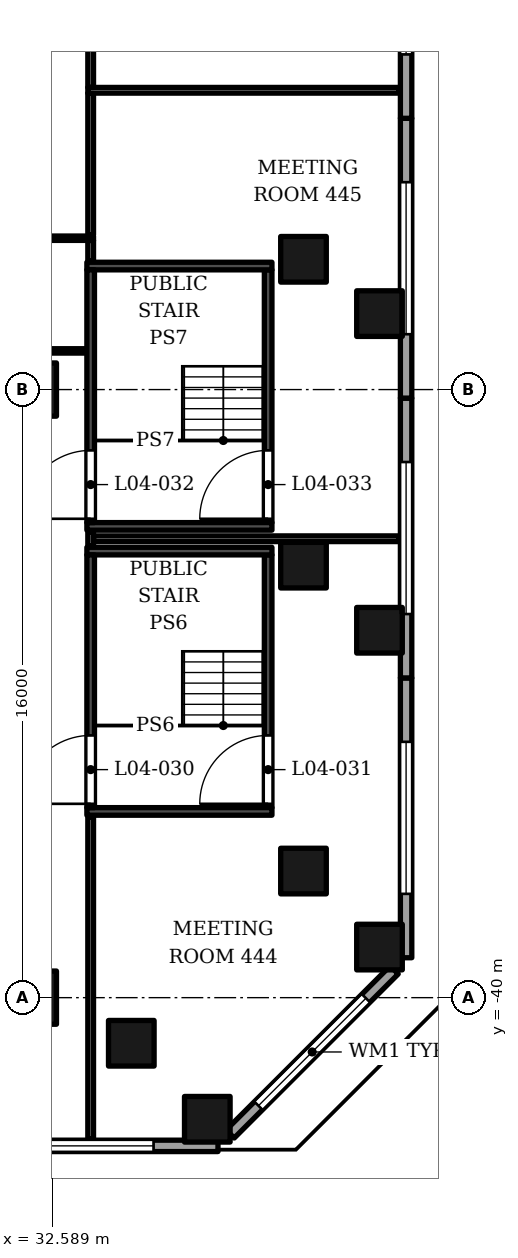
"""IFC4 building model, lengths in metres.
Left out: names, types, materials, properties, quantities, classifications, styles, units other than length and angle.
Written with IfcOpenShell. Run it as: python <this file> out.ifc"""

import sys

from ifc_helpers import new_model, si_unit, direction, frame, frame_2d, origin, origin_2d, place, context, subcontext, project, spatial, rectangle, extrude, element, fill, save


model = new_model("IFC4")
c1 = context("Model", 3, precision=1e-05, world=origin(), true_north=direction((0.0, 1.0)))
c2 = subcontext(c1, "Body", "Model", "MODEL_VIEW")
j1 = project(units=[si_unit("LENGTHUNIT", "METRE"), si_unit("PLANEANGLEUNIT", "RADIAN")], contexts=[c1])
p1 = place(None, origin())
s1 = spatial("IfcSite", under=j1, at=p1, CompositionType="ELEMENT")
p2 = place(p1, origin())
s2 = spatial("IfcBuilding", under=s1, at=p2, CompositionType="ELEMENT")
p3 = place(p2, frame((0.0, 0.0, 34.5)))
s3 = spatial("IfcBuildingStorey", under=s2, at=p3, CompositionType="ELEMENT", Elevation=34.5)
for number, where, z_axis, x_axis in (
    (1, (32.0, -40.0, 0.0), (0.0, 0.0, 1.0), (1.0, 0.0, 0.0)),
    (2, (32.0, -24.0, 0.0), (0.0, 0.0, 1.0), (1.0, 0.0, 0.0)),
):
    element("IfcColumn", number, at=place(p3, frame(where, z_axis=z_axis, x_axis=x_axis)), inside=s3, PredefinedType="COLUMN", context=c2, shape_type="SweptSolid", body=[
        extrude(rectangle(XDim=1.4, YDim=1.4, at=origin_2d()), origin(), (0.0, 0.0, 1.0), 5.5),
    ])
for number, where, z_axis, x_axis in (
    (3, (39.2, -36.669, 0.0), (0.0, 0.0, 1.0), (1.0, 0.0, 0.0)),
    (4, (34.669, -41.2, 0.0), (0.0, 0.0, 1.0), (1.0, 0.0, 0.0)),
    (5, (39.2, -20.572, 0.0), (0.0, 0.0, 1.0), (1.0, 0.0, 0.0)),
    (6, (39.2, -28.62, 0.0), (0.0, 0.0, 1.0), (1.0, 0.0, 0.0)),
    (7, (41.2, -38.669, 0.0), (0.0, 0.0, 1.0), (1.0, 0.0, 0.0)),
    (8, (36.669, -43.2, 0.0), (0.0, 0.0, 1.0), (1.0, 0.0, 0.0)),
    (9, (41.2, -22.001, 0.0), (0.0, 0.0, 1.0), (1.0, 0.0, 0.0)),
    (10, (41.2, -30.333, 0.0), (0.0, 0.0, 1.0), (1.0, 0.0, 0.0)),
):
    element("IfcColumn", number, at=place(p3, frame(where, z_axis=z_axis, x_axis=x_axis)), inside=s3, PredefinedType="COLUMN", context=c2, shape_type="SweptSolid", body=[
        extrude(rectangle(XDim=1.2, YDim=1.2, at=origin_2d()), origin(), (0.0, 0.0, 1.0), 5.5),
    ])
p4 = place(p3, frame((29.56, -43.9, 0.0), z_axis=(0.0, 0.0, 1.0), x_axis=(1.0, 0.0, 0.0)))
e11 = element("IfcWall", 11, at=p4, inside=s3, PredefinedType="SOLIDWALL", context=c2, shape_type="SweptSolid", body=[
    extrude(rectangle(XDim=7.39, YDim=0.3, at=frame_2d((3.695, 0.0))), origin(), (0.0, 0.0, 1.0), 4.1),
])
p5 = place(p4, frame((1.695, 0.0, 1.0)))
e12 = element("IfcOpeningElement", 12, at=p5, cuts=e11, PredefinedType="OPENING", context=c2, shape_type="SweptSolid", body=[
    extrude(rectangle(XDim=4.0, YDim=1.8, at=frame_2d((2.0, 0.9))), frame((0.0, 0.16, 0.0), z_axis=(0.0, -1.0, 0.0), x_axis=(1.0, 0.0, 0.0)), (0.0, 0.0, 1.0), 0.32),
])
p6 = place(p3, frame((37.271, -43.588, 0.0), z_axis=(0.0, 0.0, 1.0), x_axis=(0.707106781187, 0.707106781187, 0.0)))
e13 = element("IfcWall", 13, at=p6, inside=s3, PredefinedType="SOLIDWALL", context=c2, shape_type="SweptSolid", body=[
    extrude(rectangle(XDim=6.105, YDim=0.3, at=frame_2d((3.052, 0.0))), origin(), (0.0, 0.0, 1.0), 3.85),
])
p7 = place(p6, frame((1.052, 0.0, 1.0)))
e14 = element("IfcOpeningElement", 14, at=p7, cuts=e13, PredefinedType="OPENING", context=c2, shape_type="SweptSolid", body=[
    extrude(rectangle(XDim=4.0, YDim=1.8, at=frame_2d((2.0, 0.9))), frame((0.0, 0.16, 0.0), z_axis=(0.0, -1.0, 0.0), x_axis=(1.0, 0.0, 0.0)), (0.0, 0.0, 1.0), 0.32),
])
p8 = place(p3, frame((41.9, -38.95, 0.0), z_axis=(0.0, 0.0, 1.0), x_axis=(0.0, 1.0, 0.0)))
e15 = element("IfcWall", 15, at=p8, inside=s3, PredefinedType="SOLIDWALL", context=c2, shape_type="SweptSolid", body=[
    extrude(rectangle(XDim=7.363, YDim=0.3, at=frame_2d((3.681, 0.0))), origin(), (0.0, 0.0, 1.0), 4.1),
])
p9 = place(p8, frame((1.681, 0.0, 1.0)))
e16 = element("IfcOpeningElement", 16, at=p9, cuts=e15, PredefinedType="OPENING", context=c2, shape_type="SweptSolid", body=[
    extrude(rectangle(XDim=4.0, YDim=1.8, at=frame_2d((2.0, 0.9))), frame((0.0, 0.16, 0.0), z_axis=(0.0, -1.0, 0.0), x_axis=(1.0, 0.0, 0.0)), (0.0, 0.0, 1.0), 0.32),
])
p10 = place(p3, frame((41.9, -31.587, 0.0), z_axis=(0.0, 0.0, 1.0), x_axis=(0.0, 1.0, 0.0)))
e17 = element("IfcWall", 17, at=p10, inside=s3, PredefinedType="SOLIDWALL", context=c2, shape_type="SweptSolid", body=[
    extrude(rectangle(XDim=7.362, YDim=0.3, at=frame_2d((3.681, 0.0))), origin(), (0.0, 0.0, 1.0), 4.1),
])
p11 = place(p10, frame((1.681, 0.0, 1.0)))
e18 = element("IfcOpeningElement", 18, at=p11, cuts=e17, PredefinedType="OPENING", context=c2, shape_type="SweptSolid", body=[
    extrude(rectangle(XDim=4.0, YDim=1.8, at=frame_2d((2.0, 0.9))), frame((0.0, 0.16, 0.0), z_axis=(0.0, -1.0, 0.0), x_axis=(1.0, 0.0, 0.0)), (0.0, 0.0, 1.0), 0.32),
])
p12 = place(p3, frame((41.9, -24.225, 0.0), z_axis=(0.0, 0.0, 1.0), x_axis=(0.0, 1.0, 0.0)))
e19 = element("IfcWall", 19, at=p12, inside=s3, PredefinedType="SOLIDWALL", context=c2, shape_type="SweptSolid", body=[
    extrude(rectangle(XDim=7.363, YDim=0.3, at=frame_2d((3.681, 0.0))), origin(), (0.0, 0.0, 1.0), 4.1),
])
p13 = place(p12, frame((1.681, 0.0, 1.0)))
e20 = element("IfcOpeningElement", 20, at=p13, cuts=e19, PredefinedType="OPENING", context=c2, shape_type="SweptSolid", body=[
    extrude(rectangle(XDim=4.0, YDim=1.8, at=frame_2d((2.0, 0.9))), frame((0.0, 0.16, 0.0), z_axis=(0.0, -1.0, 0.0), x_axis=(1.0, 0.0, 0.0)), (0.0, 0.0, 1.0), 0.32),
])
p14 = place(p3, frame((41.9, -16.863, 0.0), z_axis=(0.0, 0.0, 1.0), x_axis=(0.0, 1.0, 0.0)))
e21 = element("IfcWall", 21, at=p14, inside=s3, PredefinedType="SOLIDWALL", context=c2, shape_type="SweptSolid", body=[
    extrude(rectangle(XDim=7.363, YDim=0.3, at=frame_2d((3.681, 0.0))), origin(), (0.0, 0.0, 1.0), 4.1),
])
p15 = place(p14, frame((1.681, 0.0, 1.0)))
e22 = element("IfcOpeningElement", 22, at=p15, cuts=e21, PredefinedType="OPENING", context=c2, shape_type="SweptSolid", body=[
    extrude(rectangle(XDim=4.0, YDim=1.8, at=frame_2d((2.0, 0.9))), frame((0.0, 0.16, 0.0), z_axis=(0.0, -1.0, 0.0), x_axis=(1.0, 0.0, 0.0)), (0.0, 0.0, 1.0), 0.32),
])
p16 = place(p3, frame((22.2, -43.85, 5.5), z_axis=(0.0, 0.0, 1.0), x_axis=(1.0, 0.0, 0.0)))
e23 = element("IfcWall", 23, at=p16, inside=s3, PredefinedType="PARAPET", context=c2, shape_type="SweptSolid", body=[
    extrude(rectangle(XDim=14.8, YDim=0.3, at=frame_2d((7.4, 0.0))), origin(), (0.0, 0.0, 1.0), 1.1),
])
p17 = place(p3, frame((37.042, -43.745, 5.5), z_axis=(0.0, 0.0, 1.0), x_axis=(0.707124572946, 0.70708898898, 0.0)))
e24 = element("IfcWall", 24, at=p17, inside=s3, PredefinedType="PARAPET", context=c2, shape_type="SweptSolid", body=[
    extrude(rectangle(XDim=6.861, YDim=0.3, at=frame_2d((3.431, 0.0))), origin(), (0.0, 0.0, 1.0), 1.1),
])
for number, where, z_axis, x_axis in (
    (25, (41.85, -38.79, 5.5), (0.0, 0.0, 1.0), (0.0, 1.0, 0.0)),
    (26, (41.85, -24.093, 5.5), (0.0, 0.0, 1.0), (0.0, 1.0, 0.0)),
):
    element("IfcWall", number, at=place(p3, frame(where, z_axis=z_axis, x_axis=x_axis)), inside=s3, PredefinedType="PARAPET", context=c2, shape_type="SweptSolid", body=[
        extrude(rectangle(XDim=14.698, YDim=0.3, at=frame_2d((7.349, 0.0))), origin(), (0.0, 0.0, 1.0), 1.1),
    ])
for number, where, z_axis, x_axis in (
    (27, (33.5, -35.1, 0.0), (0.0, 0.0, 1.0), (1.0, 0.0, 0.0)),
    (28, (33.5, -28.25, 0.0), (0.0, 0.0, 1.0), (1.0, 0.0, 0.0)),
):
    element("IfcWall", number, at=place(p3, frame(where, z_axis=z_axis, x_axis=x_axis)), inside=s3, PredefinedType="SOLIDWALL", context=c2, shape_type="SweptSolid", body=[
        extrude(rectangle(XDim=4.87, YDim=0.2, at=frame_2d((2.435, 0.0))), origin(), (0.0, 0.0, 1.0), 5.05),
    ])
p18 = place(p3, frame((33.6, -35.0, 0.0), z_axis=(0.0, 0.0, 1.0), x_axis=(0.0, 1.0, 0.0)))
e29 = element("IfcWall", 29, at=p18, inside=s3, PredefinedType="SOLIDWALL", context=c2, shape_type="SweptSolid", body=[
    extrude(rectangle(XDim=6.65, YDim=0.2, at=frame_2d((3.325, 0.0))), origin(), (0.0, 0.0, 1.0), 5.05),
])
p19 = place(p18, frame((0.1, 0.0, 0.0)))
e30 = element("IfcOpeningElement", 30, at=p19, cuts=e29, PredefinedType="OPENING", context=c2, shape_type="SweptSolid", body=[
    extrude(rectangle(XDim=1.8, YDim=2.4, at=frame_2d((0.9, 1.2))), frame((0.0, 0.11, 0.0), z_axis=(0.0, -1.0, 0.0), x_axis=(1.0, 0.0, 0.0)), (0.0, 0.0, 1.0), 0.22),
])
p20 = place(p3, frame((38.27, -35.0, 0.0), z_axis=(0.0, 0.0, 1.0), x_axis=(0.0, 1.0, 0.0)))
e31 = element("IfcWall", 31, at=p20, inside=s3, PredefinedType="SOLIDWALL", context=c2, shape_type="SweptSolid", body=[
    extrude(rectangle(XDim=6.65, YDim=0.2, at=frame_2d((3.325, 0.0))), origin(), (0.0, 0.0, 1.0), 5.05),
])
p21 = place(p20, frame((0.1, 0.0, 0.0)))
e32 = element("IfcOpeningElement", 32, at=p21, cuts=e31, PredefinedType="OPENING", context=c2, shape_type="SweptSolid", body=[
    extrude(rectangle(XDim=1.8, YDim=2.4, at=frame_2d((0.9, 1.2))), frame((0.0, 0.11, 0.0), z_axis=(0.0, -1.0, 0.0), x_axis=(1.0, 0.0, 0.0)), (0.0, 0.0, 1.0), 0.22),
])
for number, where, z_axis, x_axis in (
    (33, (33.5, -27.6, 0.0), (0.0, 0.0, 1.0), (1.0, 0.0, 0.0)),
    (34, (33.5, -20.75, 0.0), (0.0, 0.0, 1.0), (1.0, 0.0, 0.0)),
):
    element("IfcWall", number, at=place(p3, frame(where, z_axis=z_axis, x_axis=x_axis)), inside=s3, PredefinedType="SOLIDWALL", context=c2, shape_type="SweptSolid", body=[
        extrude(rectangle(XDim=4.87, YDim=0.2, at=frame_2d((2.435, 0.0))), origin(), (0.0, 0.0, 1.0), 5.05),
    ])
p22 = place(p3, frame((33.6, -27.5, 0.0), z_axis=(0.0, 0.0, 1.0), x_axis=(0.0, 1.0, 0.0)))
e35 = element("IfcWall", 35, at=p22, inside=s3, PredefinedType="SOLIDWALL", context=c2, shape_type="SweptSolid", body=[
    extrude(rectangle(XDim=6.65, YDim=0.2, at=frame_2d((3.325, 0.0))), origin(), (0.0, 0.0, 1.0), 5.05),
])
p23 = place(p22, frame((0.1, 0.0, 0.0)))
e36 = element("IfcOpeningElement", 36, at=p23, cuts=e35, PredefinedType="OPENING", context=c2, shape_type="SweptSolid", body=[
    extrude(rectangle(XDim=1.8, YDim=2.4, at=frame_2d((0.9, 1.2))), frame((0.0, 0.11, 0.0), z_axis=(0.0, -1.0, 0.0), x_axis=(1.0, 0.0, 0.0)), (0.0, 0.0, 1.0), 0.22),
])
p24 = place(p3, frame((38.27, -27.5, 0.0), z_axis=(0.0, 0.0, 1.0), x_axis=(0.0, 1.0, 0.0)))
e37 = element("IfcWall", 37, at=p24, inside=s3, PredefinedType="SOLIDWALL", context=c2, shape_type="SweptSolid", body=[
    extrude(rectangle(XDim=6.65, YDim=0.2, at=frame_2d((3.325, 0.0))), origin(), (0.0, 0.0, 1.0), 5.05),
])
p25 = place(p24, frame((0.1, 0.0, 0.0)))
e38 = element("IfcOpeningElement", 38, at=p25, cuts=e37, PredefinedType="OPENING", context=c2, shape_type="SweptSolid", body=[
    extrude(rectangle(XDim=1.8, YDim=2.4, at=frame_2d((0.9, 1.2))), frame((0.0, 0.11, 0.0), z_axis=(0.0, -1.0, 0.0), x_axis=(1.0, 0.0, 0.0)), (0.0, 0.0, 1.0), 0.22),
])
p26 = place(p3, frame((33.6, -43.72, 0.0), z_axis=(0.0, 0.0, 1.0), x_axis=(0.0, 1.0, 0.0)))
e39 = element("IfcWall", 39, at=p26, inside=s3, PredefinedType="PARTITIONING", context=c2, shape_type="SweptSolid", body=[
    extrude(rectangle(XDim=8.48, YDim=0.15, at=frame_2d((4.24, 0.0))), origin(), (0.0, 0.0, 1.0), 3.85),
])
p27 = place(p3, frame((33.6, -28.11, 0.0), z_axis=(0.0, 0.0, 1.0), x_axis=(0.0, 1.0, 0.0)))
e40 = element("IfcWall", 40, at=p27, inside=s3, PredefinedType="PARTITIONING", context=c2, shape_type="SweptSolid", body=[
    extrude(rectangle(XDim=0.37, YDim=0.15, at=frame_2d((0.185, 0.0))), origin(), (0.0, 0.0, 1.0), 5.05),
])
p28 = place(p3, frame((33.675, -27.925, 0.0), z_axis=(0.0, 0.0, 1.0), x_axis=(1.0, 0.0, 0.0)))
e41 = element("IfcWall", 41, at=p28, inside=s3, PredefinedType="PARTITIONING", context=c2, shape_type="SweptSolid", body=[
    extrude(rectangle(XDim=8.045, YDim=0.15, at=frame_2d((4.022, 0.0))), origin(), (0.0, 0.0, 1.0), 4.15),
])
p29 = place(p3, frame((14.77, -22.982, 0.0), z_axis=(0.0, 0.0, 1.0), x_axis=(1.0, 0.0, 0.0)))
e42 = element("IfcWall", 42, at=p29, inside=s3, PredefinedType="PARTITIONING", context=c2, shape_type="SweptSolid", body=[
    extrude(rectangle(XDim=18.69, YDim=0.115, at=frame_2d((9.345, 0.0))), origin(), (0.0, 0.0, 1.0), 3.85),
])
p30 = place(p3, frame((33.6, -20.61, 0.0), z_axis=(0.0, 0.0, 1.0), x_axis=(0.0, 1.0, 0.0)))
e43 = element("IfcWall", 43, at=p30, inside=s3, PredefinedType="PARTITIONING", context=c2, shape_type="SweptSolid", body=[
    extrude(rectangle(XDim=0.535, YDim=0.15, at=frame_2d((0.268, 0.0))), origin(), (0.0, 0.0, 1.0), 5.05),
])
p31 = place(p3, frame((14.77, -20.018, 0.0), z_axis=(0.0, 0.0, 1.0), x_axis=(1.0, 0.0, 0.0)))
e44 = element("IfcWall", 44, at=p31, inside=s3, PredefinedType="PARTITIONING", context=c2, shape_type="SweptSolid", body=[
    extrude(rectangle(XDim=18.905, YDim=0.115, at=frame_2d((9.453, 0.0))), origin(), (0.0, 0.0, 1.0), 3.85),
])
p32 = place(p31, frame((13.63, 0.0, 0.0)))
e45 = element("IfcOpeningElement", 45, at=p32, cuts=e44, PredefinedType="OPENING", context=c2, shape_type="SweptSolid", body=[
    extrude(rectangle(XDim=1.0, YDim=2.1, at=frame_2d((0.5, 1.05))), frame((0.0, 0.067, 0.0), z_axis=(0.0, -1.0, 0.0), x_axis=(1.0, 0.0, 0.0)), (0.0, 0.0, 1.0), 0.135),
])
p33 = place(p3, frame((33.6, -19.925, 0.0), z_axis=(0.0, 0.0, 1.0), x_axis=(0.0, 1.0, 0.0)))
e46 = element("IfcWall", 46, at=p33, inside=s3, PredefinedType="PARTITIONING", context=c2, shape_type="SweptSolid", body=[
    extrude(rectangle(XDim=3.725, YDim=0.15, at=frame_2d((1.863, 0.0))), origin(), (0.0, 0.0, 1.0), 5.05),
])
p34 = place(p3, frame((33.525, -16.125, 0.0), z_axis=(0.0, 0.0, 1.0), x_axis=(1.0, 0.0, 0.0)))
e47 = element("IfcWall", 47, at=p34, inside=s3, PredefinedType="PARTITIONING", context=c2, shape_type="SweptSolid", body=[
    extrude(rectangle(XDim=8.195, YDim=0.15, at=frame_2d((4.098, 0.0))), origin(), (0.0, 0.0, 1.0), 4.15),
])
p35 = place(p3, frame((33.6, -16.05, 0.0), z_axis=(0.0, 0.0, 1.0), x_axis=(0.0, 1.0, 0.0)))
e48 = element("IfcWall", 48, at=p35, inside=s3, PredefinedType="PARTITIONING", context=c2, shape_type="SweptSolid", body=[
    extrude(rectangle(XDim=4.41, YDim=0.15, at=frame_2d((2.205, 0.0))), origin(), (0.0, 0.0, 1.0), 5.05),
])
p36 = place(p5, origin())
e49 = element("IfcWindow", 49, at=p36, inside=s3, PartitioningType="SINGLE_PANEL", PredefinedType="WINDOW", context=c2, shape_type="SweptSolid", body=[
    extrude(rectangle(XDim=4.0, YDim=1.8, at=frame_2d((2.0, 0.9))), frame((0.0, 0.03, 0.0), z_axis=(0.0, -1.0, 0.0), x_axis=(1.0, 0.0, 0.0)), (0.0, 0.0, 1.0), 0.06),
])
fill(e12, e49)
p37 = place(p7, origin())
e50 = element("IfcWindow", 50, at=p37, inside=s3, PartitioningType="SINGLE_PANEL", PredefinedType="WINDOW", context=c2, shape_type="SweptSolid", body=[
    extrude(rectangle(XDim=4.0, YDim=1.8, at=frame_2d((2.0, 0.9))), frame((0.0, 0.03, 0.0), z_axis=(0.0, -1.0, 0.0), x_axis=(1.0, 0.0, 0.0)), (0.0, 0.0, 1.0), 0.06),
])
fill(e14, e50)
p38 = place(p9, origin())
e51 = element("IfcWindow", 51, at=p38, inside=s3, PartitioningType="SINGLE_PANEL", PredefinedType="WINDOW", context=c2, shape_type="SweptSolid", body=[
    extrude(rectangle(XDim=4.0, YDim=1.8, at=frame_2d((2.0, 0.9))), frame((0.0, 0.03, 0.0), z_axis=(0.0, -1.0, 0.0), x_axis=(1.0, 0.0, 0.0)), (0.0, 0.0, 1.0), 0.06),
])
fill(e16, e51)
p39 = place(p11, origin())
e52 = element("IfcWindow", 52, at=p39, inside=s3, PartitioningType="SINGLE_PANEL", PredefinedType="WINDOW", context=c2, shape_type="SweptSolid", body=[
    extrude(rectangle(XDim=4.0, YDim=1.8, at=frame_2d((2.0, 0.9))), frame((0.0, 0.03, 0.0), z_axis=(0.0, -1.0, 0.0), x_axis=(1.0, 0.0, 0.0)), (0.0, 0.0, 1.0), 0.06),
])
fill(e18, e52)
p40 = place(p13, origin())
e53 = element("IfcWindow", 53, at=p40, inside=s3, PartitioningType="SINGLE_PANEL", PredefinedType="WINDOW", context=c2, shape_type="SweptSolid", body=[
    extrude(rectangle(XDim=4.0, YDim=1.8, at=frame_2d((2.0, 0.9))), frame((0.0, 0.03, 0.0), z_axis=(0.0, -1.0, 0.0), x_axis=(1.0, 0.0, 0.0)), (0.0, 0.0, 1.0), 0.06),
])
fill(e20, e53)
p41 = place(p15, origin())
e54 = element("IfcWindow", 54, at=p41, inside=s3, PartitioningType="SINGLE_PANEL", PredefinedType="WINDOW", context=c2, shape_type="SweptSolid", body=[
    extrude(rectangle(XDim=4.0, YDim=1.8, at=frame_2d((2.0, 0.9))), frame((0.0, 0.03, 0.0), z_axis=(0.0, -1.0, 0.0), x_axis=(1.0, 0.0, 0.0)), (0.0, 0.0, 1.0), 0.06),
])
fill(e22, e54)
p42 = place(p19, origin())
e55 = element("IfcDoor", 55, at=p42, inside=s3, OperationType="DOUBLE_DOOR_SINGLE_SWING", PredefinedType="DOOR", context=c2, shape_type="SweptSolid", body=[
    extrude(rectangle(XDim=1.8, YDim=2.4, at=frame_2d((0.9, 1.2))), frame((0.0, 0.025, 0.0), z_axis=(0.0, -1.0, 0.0), x_axis=(1.0, 0.0, 0.0)), (0.0, 0.0, 1.0), 0.05),
])
fill(e30, e55)
p43 = place(p21, origin())
e56 = element("IfcDoor", 56, at=p43, inside=s3, OperationType="DOUBLE_DOOR_SINGLE_SWING", PredefinedType="DOOR", context=c2, shape_type="SweptSolid", body=[
    extrude(rectangle(XDim=1.8, YDim=2.4, at=frame_2d((0.9, 1.2))), frame((0.0, 0.025, 0.0), z_axis=(0.0, -1.0, 0.0), x_axis=(1.0, 0.0, 0.0)), (0.0, 0.0, 1.0), 0.05),
])
fill(e32, e56)
p44 = place(p23, origin())
e57 = element("IfcDoor", 57, at=p44, inside=s3, OperationType="DOUBLE_DOOR_SINGLE_SWING", PredefinedType="DOOR", context=c2, shape_type="SweptSolid", body=[
    extrude(rectangle(XDim=1.8, YDim=2.4, at=frame_2d((0.9, 1.2))), frame((0.0, 0.025, 0.0), z_axis=(0.0, -1.0, 0.0), x_axis=(1.0, 0.0, 0.0)), (0.0, 0.0, 1.0), 0.05),
])
fill(e36, e57)
p45 = place(p25, origin())
e58 = element("IfcDoor", 58, at=p45, inside=s3, OperationType="DOUBLE_DOOR_SINGLE_SWING", PredefinedType="DOOR", context=c2, shape_type="SweptSolid", body=[
    extrude(rectangle(XDim=1.8, YDim=2.4, at=frame_2d((0.9, 1.2))), frame((0.0, 0.025, 0.0), z_axis=(0.0, -1.0, 0.0), x_axis=(1.0, 0.0, 0.0)), (0.0, 0.0, 1.0), 0.05),
])
fill(e38, e58)
save(model, sys.argv[1])
